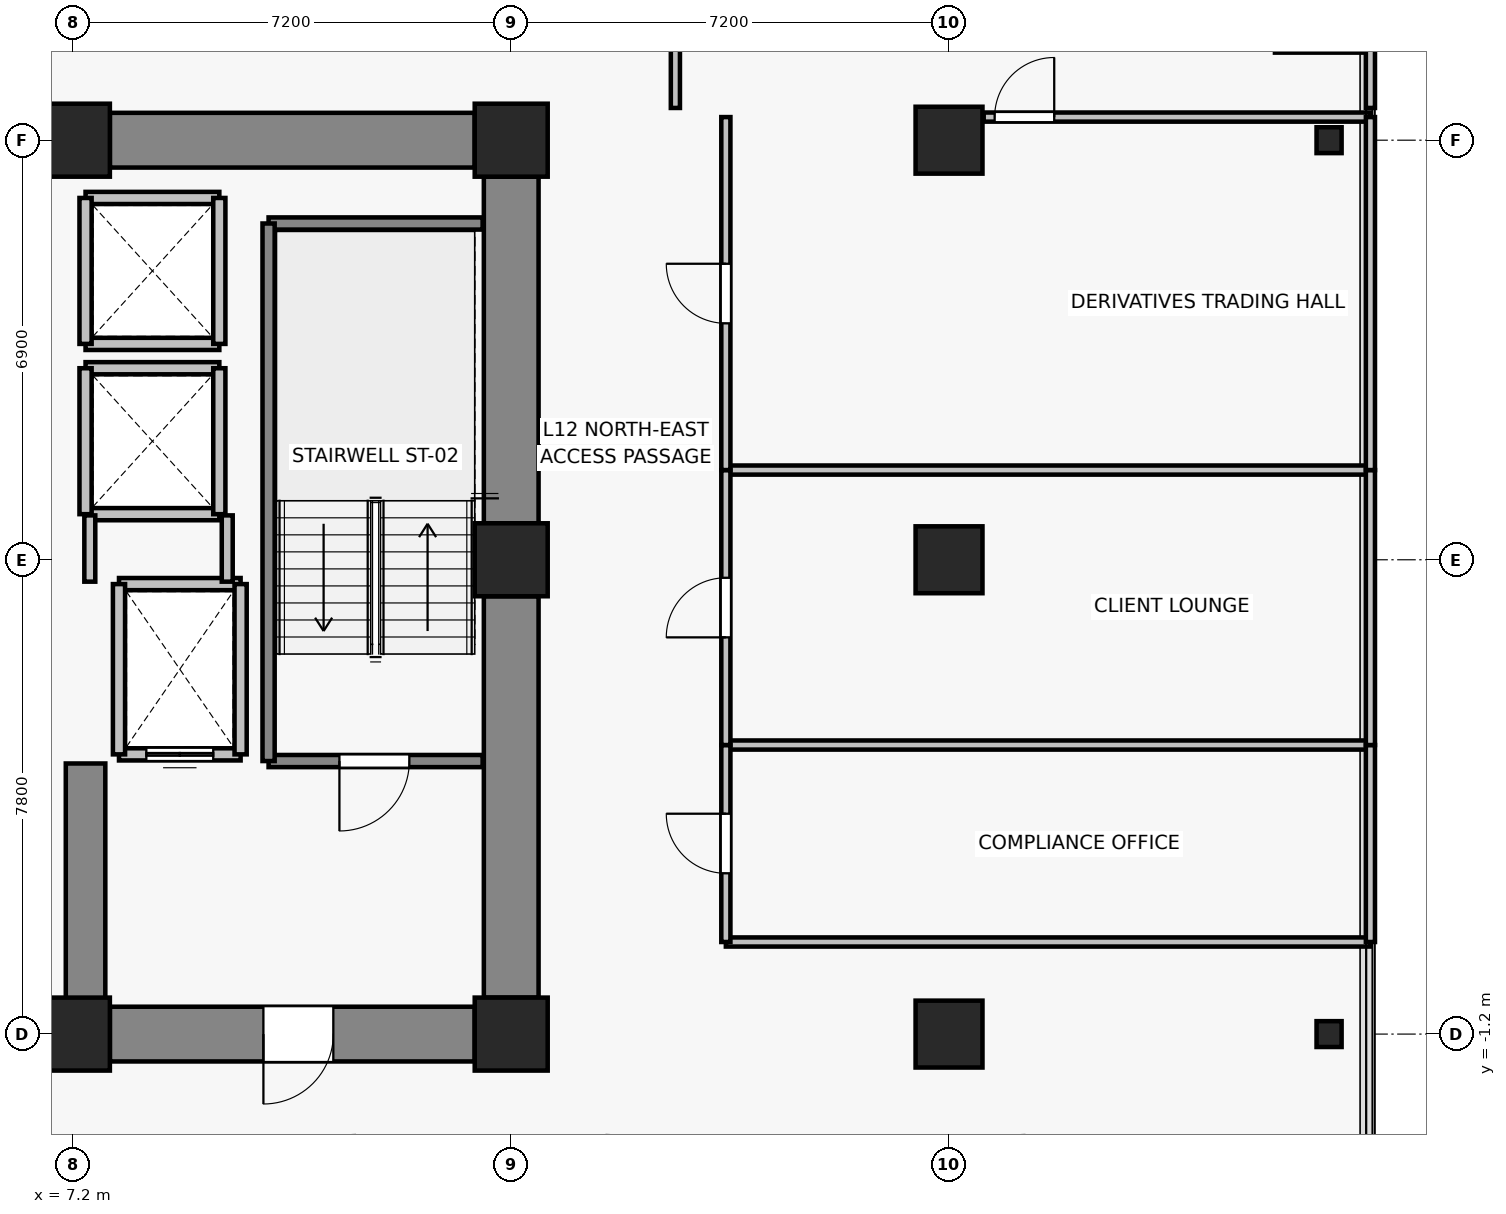
"""IFC4 building model, lengths in metres.
Left out: names, types, materials, properties, quantities, classifications, styles, units other than length and angle.
Written with IfcOpenShell. Run it as: python <this file> out.ifc"""

import sys

from ifc_helpers import new_model, si_unit, direction, frame, frame_2d, origin, origin_2d, place, context, subcontext, project, spatial, rectangle, i_section, extrude, source, transform, mapped, element, fill, save


model = new_model("IFC4")
c1 = context("Model", 3, precision=1e-05, world=origin(), true_north=direction((0.0, 1.0)))
c2 = subcontext(c1, "Body", "Model", "MODEL_VIEW")
j1 = project(units=[si_unit("LENGTHUNIT", "METRE"), si_unit("PLANEANGLEUNIT", "RADIAN")], contexts=[c1])
p1 = place(None, origin())
s1 = spatial("IfcSite", under=j1, at=p1, CompositionType="ELEMENT")
p2 = place(p1, origin())
s2 = spatial("IfcBuilding", under=s1, at=p2, CompositionType="ELEMENT")
p3 = place(p2, frame((0.0, 0.0, 47.2)))
s3 = spatial("IfcBuildingStorey", under=s2, at=p3, CompositionType="ELEMENT", Elevation=47.2)
for number, where, z_axis, x_axis in (
    (1, (7.2, -1.2, 0.0), (0.0, 0.0, 1.0), (1.0, 0.0, 0.0)),
    (2, (14.4, -1.2, 0.0), (0.0, 0.0, 1.0), (1.0, 0.0, 0.0)),
    (3, (14.4, 6.6, 0.0), (0.0, 0.0, 1.0), (1.0, 0.0, 0.0)),
    (4, (7.2, 13.5, 0.0), (0.0, 0.0, 1.0), (1.0, 0.0, 0.0)),
    (5, (14.4, 13.5, 0.0), (0.0, 0.0, 1.0), (1.0, 0.0, 0.0)),
):
    element("IfcColumn", number, at=place(p3, frame(where, z_axis=z_axis, x_axis=x_axis)), inside=s3, PredefinedType="COLUMN", context=c2, shape_type="SweptSolid", body=[
        extrude(rectangle(XDim=1.2, YDim=1.2, at=origin_2d()), origin(), (0.0, 0.0, 1.0), 3.3),
    ])
for number, where, z_axis, x_axis in (
    (6, (21.6, -1.2, 0.0), (0.0, 0.0, 1.0), (1.0, 0.0, 0.0)),
    (7, (21.6, 6.6, 0.0), (0.0, 0.0, 1.0), (1.0, 0.0, 0.0)),
    (8, (21.6, 13.5, 0.0), (0.0, 0.0, 1.0), (1.0, 0.0, 0.0)),
):
    element("IfcColumn", number, at=place(p3, frame(where, z_axis=z_axis, x_axis=x_axis)), inside=s3, PredefinedType="COLUMN", context=c2, shape_type="SweptSolid", body=[
        extrude(rectangle(XDim=1.1, YDim=1.1, at=origin_2d()), origin(), (0.0, 0.0, 1.0), 3.3),
    ])
for number, where, z_axis, x_axis in (
    (9, (27.85, -1.2, 0.0), (0.0, 0.0, 1.0), (1.0, 0.0, 0.0)),
    (10, (27.85, 13.5, 0.0), (0.0, 0.0, 1.0), (1.0, 0.0, 0.0)),
):
    element("IfcColumn", number, at=place(p3, frame(where, z_axis=z_axis, x_axis=x_axis)), inside=s3, PredefinedType="COLUMN", context=c2, shape_type="SweptSolid", body=[
        extrude(i_section(OverallWidth=0.412, OverallDepth=0.425, WebThickness=0.026, FlangeThickness=0.039, FilletRadius=0.015, at=origin_2d()), origin(), (0.0, 0.0, 1.0), 3.3),
    ])
p4 = place(p3, frame((7.8, 13.5, 0.0), z_axis=(0.0, 0.0, 1.0), x_axis=(1.0, 0.0, 0.0)))
e11 = element("IfcWall", 11, at=p4, inside=s3, PredefinedType="SHEAR", context=c2, shape_type="SweptSolid", body=[
    extrude(rectangle(XDim=6.0, YDim=0.9, at=frame_2d((3.0, 0.0))), origin(), (0.0, 0.0, 1.0), 3.075),
])
p5 = place(p3, frame((14.4, -0.6, 0.0), z_axis=(0.0, 0.0, 1.0), x_axis=(0.0, 1.0, 0.0)))
e12 = element("IfcWall", 12, at=p5, inside=s3, PredefinedType="SHEAR", context=c2, shape_type="SweptSolid", body=[
    extrude(rectangle(XDim=6.6, YDim=0.9, at=frame_2d((3.3, 0.0))), origin(), (0.0, 0.0, 1.0), 3.075),
])
p6 = place(p3, frame((14.4, 7.2, 0.0), z_axis=(0.0, 0.0, 1.0), x_axis=(0.0, 1.0, 0.0)))
e13 = element("IfcWall", 13, at=p6, inside=s3, PredefinedType="SHEAR", context=c2, shape_type="SweptSolid", body=[
    extrude(rectangle(XDim=5.7, YDim=0.9, at=frame_2d((2.85, 0.0))), origin(), (0.0, 0.0, 1.0), 3.075),
])
p7 = place(p3, frame((13.8, -1.2, 0.0), z_axis=(0.0, 0.0, 1.0), x_axis=(-1.0, 0.0, 0.0)))
e14 = element("IfcWall", 14, at=p7, inside=s3, PredefinedType="SHEAR", context=c2, shape_type="SweptSolid", body=[
    extrude(rectangle(XDim=6.0, YDim=0.9, at=frame_2d((3.0, 0.0))), origin(), (0.0, 0.0, 1.0), 3.075),
])
p8 = place(p7, frame((2.325, 0.0, 0.0)))
e15 = element("IfcOpeningElement", 15, at=p8, cuts=e14, PredefinedType="OPENING", context=c2, shape_type="SweptSolid", body=[
    extrude(rectangle(XDim=1.15, YDim=2.15, at=frame_2d((0.575, 1.075))), frame((0.0, 0.46, 0.0), z_axis=(0.0, -1.0, 0.0), x_axis=(1.0, 0.0, 0.0)), (0.0, 0.0, 1.0), 0.92),
])
p9 = place(p3, frame((7.4, -0.75, 0.0), z_axis=(0.0, 0.0, 1.0), x_axis=(0.0, 1.0, 0.0)))
e16 = element("IfcWall", 16, at=p9, inside=s3, PredefinedType="SHEAR", context=c2, shape_type="SweptSolid", body=[
    extrude(rectangle(XDim=4.0, YDim=0.65, at=frame_2d((2.0, 0.0))), origin(), (0.0, 0.0, 1.0), 3.075),
])
p10 = place(p3, frame((28.46, 15.06, 0.0), z_axis=(0.0, 0.0, 1.0), x_axis=(-1.0, 0.0, 0.0)))
e17 = element("IfcWall", 17, at=p10, inside=s3, PredefinedType="SOLIDWALL", context=c2, shape_type="SweptSolid", body=[
    extrude(rectangle(XDim=1.5, YDim=0.24, at=frame_2d((0.75, 0.0))), origin(), (0.0, 0.0, 1.0), 3.075),
])
p11 = place(p3, frame((9.95, 3.4, 0.0), z_axis=(0.0, 0.0, 1.0), x_axis=(-1.0, 0.0, 0.0)))
e18 = element("IfcWall", 18, at=p11, inside=s3, PredefinedType="SOLIDWALL", context=c2, shape_type="SweptSolid", body=[
    extrude(rectangle(XDim=2.0, YDim=0.2, at=frame_2d((1.0, 0.0))), origin(), (0.0, 0.0, 1.0), 3.075),
])
p12 = place(p11, frame((0.45, 0.0, 0.0)))
e19 = element("IfcOpeningElement", 19, at=p12, cuts=e18, PredefinedType="OPENING", context=c2, shape_type="SweptSolid", body=[
    extrude(rectangle(XDim=1.1, YDim=2.2, at=frame_2d((0.55, 1.1))), frame((0.0, 0.11, 0.0), z_axis=(0.0, -1.0, 0.0), x_axis=(1.0, 0.0, 0.0)), (0.0, 0.0, 1.0), 0.22),
])
p13 = place(p3, frame((7.95, 6.2, 0.0), z_axis=(0.0, 0.0, 1.0), x_axis=(1.0, 0.0, 0.0)))
e20 = element("IfcWall", 20, at=p13, inside=s3, PredefinedType="SOLIDWALL", context=c2, shape_type="SweptSolid", body=[
    extrude(rectangle(XDim=2.0, YDim=0.2, at=frame_2d((1.0, 0.0))), origin(), (0.0, 0.0, 1.0), 3.075),
])
for number, where, z_axis, x_axis in (
    (21, (7.95, 3.4, 0.0), (0.0, 0.0, 1.0), (0.0, 1.0, 0.0)),
    (22, (9.95, 6.2, 0.0), (0.0, 0.0, 1.0), (0.0, -1.0, 0.0)),
):
    element("IfcWall", number, at=place(p3, frame(where, z_axis=z_axis, x_axis=x_axis)), inside=s3, PredefinedType="SOLIDWALL", context=c2, shape_type="SweptSolid", body=[
        extrude(rectangle(XDim=2.8, YDim=0.2, at=frame_2d((1.4, 0.0))), origin(), (0.0, 0.0, 1.0), 3.075),
    ])
for number, where, z_axis, x_axis in (
    (23, (9.6, 7.35, 0.0), (0.0, 0.0, 1.0), (-1.0, 0.0, 0.0)),
    (24, (7.4, 9.75, 0.0), (0.0, 0.0, 1.0), (1.0, 0.0, 0.0)),
):
    element("IfcWall", number, at=place(p3, frame(where, z_axis=z_axis, x_axis=x_axis)), inside=s3, PredefinedType="SOLIDWALL", context=c2, shape_type="SweptSolid", body=[
        extrude(rectangle(XDim=2.2, YDim=0.2, at=frame_2d((1.1, 0.0))), origin(), (0.0, 0.0, 1.0), 2.465),
    ])
p14 = place(p3, frame((7.4, 7.35, 0.0), z_axis=(0.0, 0.0, 1.0), x_axis=(0.0, 1.0, 0.0)))
e25 = element("IfcWall", 25, at=p14, inside=s3, PredefinedType="SOLIDWALL", context=c2, shape_type="SweptSolid", body=[
    extrude(rectangle(XDim=2.4, YDim=0.2, at=frame_2d((1.2, 0.0))), origin(), (0.0, 0.0, 1.0), 2.465),
])
p15 = place(p3, frame((9.6, 9.75, 0.0), z_axis=(0.0, 0.0, 1.0), x_axis=(0.0, -1.0, 0.0)))
e26 = element("IfcWall", 26, at=p15, inside=s3, PredefinedType="SOLIDWALL", context=c2, shape_type="SweptSolid", body=[
    extrude(rectangle(XDim=2.4, YDim=0.2, at=frame_2d((1.2, 0.0))), origin(), (0.0, 0.0, 1.0), 3.075),
])
for number, where, z_axis, x_axis in (
    (27, (9.6, 10.15, 0.0), (0.0, 0.0, 1.0), (-1.0, 0.0, 0.0)),
    (28, (7.4, 12.55, 0.0), (0.0, 0.0, 1.0), (1.0, 0.0, 0.0)),
):
    element("IfcWall", number, at=place(p3, frame(where, z_axis=z_axis, x_axis=x_axis)), inside=s3, PredefinedType="SOLIDWALL", context=c2, shape_type="SweptSolid", body=[
        extrude(rectangle(XDim=2.2, YDim=0.2, at=frame_2d((1.1, 0.0))), origin(), (0.0, 0.0, 1.0), 2.465),
    ])
p16 = place(p3, frame((7.4, 10.15, 0.0), z_axis=(0.0, 0.0, 1.0), x_axis=(0.0, 1.0, 0.0)))
e29 = element("IfcWall", 29, at=p16, inside=s3, PredefinedType="SOLIDWALL", context=c2, shape_type="SweptSolid", body=[
    extrude(rectangle(XDim=2.4, YDim=0.2, at=frame_2d((1.2, 0.0))), origin(), (0.0, 0.0, 1.0), 2.465),
])
p17 = place(p3, frame((9.6, 12.55, 0.0), z_axis=(0.0, 0.0, 1.0), x_axis=(0.0, -1.0, 0.0)))
e30 = element("IfcWall", 30, at=p17, inside=s3, PredefinedType="SOLIDWALL", context=c2, shape_type="SweptSolid", body=[
    extrude(rectangle(XDim=2.4, YDim=0.2, at=frame_2d((1.2, 0.0))), origin(), (0.0, 0.0, 1.0), 3.075),
])
p18 = place(p3, frame((13.93, 3.29, 0.0), z_axis=(0.0, 0.0, 1.0), x_axis=(-1.0, 0.0, 0.0)))
e31 = element("IfcWall", 31, at=p18, inside=s3, PredefinedType="SOLIDWALL", context=c2, shape_type="SweptSolid", body=[
    extrude(rectangle(XDim=3.52, YDim=0.2, at=frame_2d((1.76, 0.0))), origin(), (0.0, 0.0, 1.0), 3.075),
])
p19 = place(p18, frame((1.205, 0.0, 0.0)))
e32 = element("IfcOpeningElement", 32, at=p19, cuts=e31, PredefinedType="OPENING", context=c2, shape_type="SweptSolid", body=[
    extrude(rectangle(XDim=1.15, YDim=2.15, at=frame_2d((0.575, 1.075))), frame((0.0, 0.11, 0.0), z_axis=(0.0, -1.0, 0.0), x_axis=(1.0, 0.0, 0.0)), (0.0, 0.0, 1.0), 0.22),
])
p20 = place(p3, frame((10.41, 12.13, 0.0), z_axis=(0.0, 0.0, 1.0), x_axis=(1.0, 0.0, 0.0)))
e33 = element("IfcWall", 33, at=p20, inside=s3, PredefinedType="SOLIDWALL", context=c2, shape_type="SweptSolid", body=[
    extrude(rectangle(XDim=3.52, YDim=0.2, at=frame_2d((1.76, 0.0))), origin(), (0.0, 0.0, 1.0), 3.075),
])
p21 = place(p3, frame((10.41, 3.29, 0.0), z_axis=(0.0, 0.0, 1.0), x_axis=(0.0, 1.0, 0.0)))
e34 = element("IfcWall", 34, at=p21, inside=s3, PredefinedType="SOLIDWALL", context=c2, shape_type="SweptSolid", body=[
    extrude(rectangle(XDim=8.84, YDim=0.2, at=frame_2d((4.42, 0.0))), origin(), (0.0, 0.0, 1.0), 3.075),
])
p22 = place(p3, frame((7.47, 6.24, 0.0), z_axis=(0.0, 0.0, 1.0), x_axis=(0.0, 1.0, 0.0)))
e35 = element("IfcWall", 35, at=p22, inside=s3, PredefinedType="PARTITIONING", context=c2, shape_type="SweptSolid", body=[
    extrude(rectangle(XDim=1.09, YDim=0.18, at=frame_2d((0.545, 0.0))), origin(), (0.0, 0.0, 1.0), 2.465),
])
p23 = place(p3, frame((9.73, 7.33, 0.0), z_axis=(0.0, 0.0, 1.0), x_axis=(0.0, -1.0, 0.0)))
e36 = element("IfcWall", 36, at=p23, inside=s3, PredefinedType="PARTITIONING", context=c2, shape_type="SweptSolid", body=[
    extrude(rectangle(XDim=1.09, YDim=0.18, at=frame_2d((0.545, 0.0))), origin(), (0.0, 0.0, 1.0), 3.075),
])
for number, where, z_axis, x_axis in (
    (37, (28.53, 0.314, 0.0), (0.0, 0.0, 1.0), (-1.0, 0.0, 0.0)),
    (38, (17.93, 3.553, 0.0), (0.0, 0.0, 1.0), (1.0, 0.0, 0.0)),
):
    element("IfcWall", number, at=place(p3, frame(where, z_axis=z_axis, x_axis=x_axis)), inside=s3, PredefinedType="PARTITIONING", context=c2, shape_type="SweptSolid", body=[
        extrude(rectangle(XDim=10.6, YDim=0.15, at=frame_2d((5.3, 0.0))), origin(), (0.0, 0.0, 1.0), 2.465),
    ])
p24 = place(p3, frame((17.93, 0.314, 0.0), z_axis=(0.0, 0.0, 1.0), x_axis=(0.0, 1.0, 0.0)))
e39 = element("IfcWall", 39, at=p24, inside=s3, PredefinedType="PARTITIONING", context=c2, shape_type="SweptSolid", body=[
    extrude(rectangle(XDim=3.239, YDim=0.15, at=frame_2d((1.62, 0.0))), origin(), (0.0, 0.0, 1.0), 3.075),
])
p25 = place(p24, frame((1.13, 0.0, 0.0)))
e40 = element("IfcOpeningElement", 40, at=p25, cuts=e39, PredefinedType="OPENING", context=c2, shape_type="SweptSolid", body=[
    extrude(rectangle(XDim=0.98, YDim=2.15, at=frame_2d((0.49, 1.075))), frame((0.0, 0.085, 0.0), z_axis=(0.0, -1.0, 0.0), x_axis=(1.0, 0.0, 0.0)), (0.0, 0.0, 1.0), 0.17),
])
p26 = place(p3, frame((28.53, 3.553, 0.0), z_axis=(0.0, 0.0, 1.0), x_axis=(0.0, -1.0, 0.0)))
e41 = element("IfcWall", 41, at=p26, inside=s3, PredefinedType="PARTITIONING", context=c2, shape_type="SweptSolid", body=[
    extrude(rectangle(XDim=3.239, YDim=0.15, at=frame_2d((1.62, 0.0))), origin(), (0.0, 0.0, 1.0), 3.075),
])
p27 = place(p3, frame((17.93, 8.075, 0.0), z_axis=(0.0, 0.0, 1.0), x_axis=(1.0, 0.0, 0.0)))
e42 = element("IfcWall", 42, at=p27, inside=s3, PredefinedType="PARTITIONING", context=c2, shape_type="SweptSolid", body=[
    extrude(rectangle(XDim=10.6, YDim=0.15, at=frame_2d((5.3, 0.0))), origin(), (0.0, 0.0, 1.0), 2.465),
])
p28 = place(p3, frame((17.93, 3.553, 0.0), z_axis=(0.0, 0.0, 1.0), x_axis=(0.0, 1.0, 0.0)))
e43 = element("IfcWall", 43, at=p28, inside=s3, PredefinedType="PARTITIONING", context=c2, shape_type="SweptSolid", body=[
    extrude(rectangle(XDim=4.522, YDim=0.15, at=frame_2d((2.261, 0.0))), origin(), (0.0, 0.0, 1.0), 2.465),
])
p29 = place(p28, frame((1.771, 0.0, 0.0)))
e44 = element("IfcOpeningElement", 44, at=p29, cuts=e43, PredefinedType="OPENING", context=c2, shape_type="SweptSolid", body=[
    extrude(rectangle(XDim=0.98, YDim=2.15, at=frame_2d((0.49, 1.075))), frame((0.0, 0.085, 0.0), z_axis=(0.0, -1.0, 0.0), x_axis=(1.0, 0.0, 0.0)), (0.0, 0.0, 1.0), 0.17),
])
p30 = place(p3, frame((28.53, 8.075, 0.0), z_axis=(0.0, 0.0, 1.0), x_axis=(0.0, -1.0, 0.0)))
e45 = element("IfcWall", 45, at=p30, inside=s3, PredefinedType="PARTITIONING", context=c2, shape_type="SweptSolid", body=[
    extrude(rectangle(XDim=4.522, YDim=0.15, at=frame_2d((2.261, 0.0))), origin(), (0.0, 0.0, 1.0), 3.075),
])
p31 = place(p3, frame((22.17, 13.88, 0.0), z_axis=(0.0, 0.0, 1.0), x_axis=(1.0, 0.0, 0.0)))
e46 = element("IfcWall", 46, at=p31, inside=s3, PredefinedType="PARTITIONING", context=c2, shape_type="SweptSolid", body=[
    extrude(rectangle(XDim=6.36, YDim=0.15, at=frame_2d((3.18, 0.0))), origin(), (0.0, 0.0, 1.0), 3.075),
])
p32 = place(p31, frame((0.18, 0.0, 0.0)))
e47 = element("IfcOpeningElement", 47, at=p32, cuts=e46, PredefinedType="OPENING", context=c2, shape_type="SweptSolid", body=[
    extrude(rectangle(XDim=0.98, YDim=2.15, at=frame_2d((0.49, 1.075))), frame((0.0, 0.085, 0.0), z_axis=(0.0, -1.0, 0.0), x_axis=(1.0, 0.0, 0.0)), (0.0, 0.0, 1.0), 0.17),
])
p33 = place(p3, frame((17.93, 8.075, 0.0), z_axis=(0.0, 0.0, 1.0), x_axis=(0.0, 1.0, 0.0)))
e48 = element("IfcWall", 48, at=p33, inside=s3, PredefinedType="PARTITIONING", context=c2, shape_type="SweptSolid", body=[
    extrude(rectangle(XDim=5.805, YDim=0.15, at=frame_2d((2.902, 0.0))), origin(), (0.0, 0.0, 1.0), 2.465),
])
p34 = place(p33, frame((2.413, 0.0, 0.0)))
e49 = element("IfcOpeningElement", 49, at=p34, cuts=e48, PredefinedType="OPENING", context=c2, shape_type="SweptSolid", body=[
    extrude(rectangle(XDim=0.98, YDim=2.15, at=frame_2d((0.49, 1.075))), frame((0.0, 0.085, 0.0), z_axis=(0.0, -1.0, 0.0), x_axis=(1.0, 0.0, 0.0)), (0.0, 0.0, 1.0), 0.17),
])
p35 = place(p3, frame((28.53, 13.88, 0.0), z_axis=(0.0, 0.0, 1.0), x_axis=(0.0, -1.0, 0.0)))
e50 = element("IfcWall", 50, at=p35, inside=s3, PredefinedType="PARTITIONING", context=c2, shape_type="SweptSolid", body=[
    extrude(rectangle(XDim=5.805, YDim=0.15, at=frame_2d((2.902, 0.0))), origin(), (0.0, 0.0, 1.0), 3.075),
])
p36 = place(p3, frame((17.1, 18.13, 0.0), z_axis=(0.0, 0.0, 1.0), x_axis=(0.0, -1.0, 0.0)))
e51 = element("IfcWall", 51, at=p36, inside=s3, PredefinedType="PARTITIONING", context=c2, shape_type="SweptSolid", body=[
    extrude(rectangle(XDim=4.1, YDim=0.15, at=frame_2d((2.05, 0.0))), origin(), (0.0, 0.0, 1.0), 2.465),
])
p37 = place(p3, frame((28.53, 18.13, 0.0), z_axis=(0.0, 0.0, 1.0), x_axis=(0.0, -1.0, 0.0)))
e52 = element("IfcWall", 52, at=p37, inside=s3, PredefinedType="PARTITIONING", context=c2, shape_type="SweptSolid", body=[
    extrude(rectangle(XDim=4.1, YDim=0.15, at=frame_2d((2.05, 0.0))), origin(), (0.0, 0.0, 1.0), 3.075),
])
m1 = source(origin(), c2, "Body", "SweptSolid", [
    extrude(rectangle(XDim=1.1, YDim=2.2, at=frame_2d((0.55, 1.1))), frame((0.0, 0.025, 0.0), z_axis=(0.0, -1.0, 0.0), x_axis=(1.0, 0.0, 0.0)), (0.0, 0.0, 1.0), 0.05),
])
p38 = place(p12, origin())
e53 = element("IfcDoor", 53, at=p38, inside=s3, OperationType="DOUBLE_DOOR_SLIDING", PredefinedType="DOOR", context=c2, shape_type="MappedRepresentation", body=[
    mapped(m1, transform((0.0, 0.0, 0.0), x_axis=(1.0, 0.0, 0.0), y_axis=(0.0, 1.0, 0.0), z_axis=(0.0, 0.0, 1.0), scale=1.0)),
])
fill(e19, e53)
m2 = source(origin(), c2, "Body", "SweptSolid", [
    extrude(rectangle(XDim=1.15, YDim=2.15, at=frame_2d((0.575, 1.075))), frame((0.0, 0.025, 0.0), z_axis=(0.0, -1.0, 0.0), x_axis=(1.0, 0.0, 0.0)), (0.0, 0.0, 1.0), 0.05),
])
p39 = place(p19, origin())
e54 = element("IfcDoor", 54, at=p39, inside=s3, OperationType="SINGLE_SWING_RIGHT", PredefinedType="DOOR", context=c2, shape_type="MappedRepresentation", body=[
    mapped(m2, transform((0.0, 0.0, 0.0), x_axis=(1.0, 0.0, 0.0), y_axis=(0.0, 1.0, 0.0), z_axis=(0.0, 0.0, 1.0), scale=1.0)),
])
fill(e32, e54)
p40 = place(p8, origin())
e55 = element("IfcDoor", 55, at=p40, inside=s3, OperationType="SINGLE_SWING_RIGHT", PredefinedType="DOOR", context=c2, shape_type="MappedRepresentation", body=[
    mapped(m2, transform((0.0, 0.0, 0.0), x_axis=(1.0, 0.0, 0.0), y_axis=(0.0, 1.0, 0.0), z_axis=(0.0, 0.0, 1.0), scale=1.0)),
])
fill(e15, e55)
m3 = source(origin(), c2, "Body", "SweptSolid", [
    extrude(rectangle(XDim=0.98, YDim=2.15, at=frame_2d((0.49, 1.075))), frame((0.0, 0.025, 0.0), z_axis=(0.0, -1.0, 0.0), x_axis=(1.0, 0.0, 0.0)), (0.0, 0.0, 1.0), 0.05),
])
p41 = place(p25, origin())
e56 = element("IfcDoor", 56, at=p41, inside=s3, OperationType="SINGLE_SWING_RIGHT", PredefinedType="DOOR", context=c2, shape_type="MappedRepresentation", body=[
    mapped(m3, transform((0.0, 0.0, 0.0), x_axis=(1.0, 0.0, 0.0), y_axis=(0.0, 1.0, 0.0), z_axis=(0.0, 0.0, 1.0), scale=1.0)),
])
fill(e40, e56)
p42 = place(p29, origin())
e57 = element("IfcDoor", 57, at=p42, inside=s3, OperationType="SINGLE_SWING_LEFT", PredefinedType="DOOR", context=c2, shape_type="MappedRepresentation", body=[
    mapped(m3, transform((0.0, 0.0, 0.0), x_axis=(1.0, 0.0, 0.0), y_axis=(0.0, 1.0, 0.0), z_axis=(0.0, 0.0, 1.0), scale=1.0)),
])
fill(e44, e57)
p43 = place(p34, origin())
e58 = element("IfcDoor", 58, at=p43, inside=s3, OperationType="SINGLE_SWING_RIGHT", PredefinedType="DOOR", context=c2, shape_type="MappedRepresentation", body=[
    mapped(m3, transform((0.0, 0.0, 0.0), x_axis=(1.0, 0.0, 0.0), y_axis=(0.0, 1.0, 0.0), z_axis=(0.0, 0.0, 1.0), scale=1.0)),
])
fill(e49, e58)
p44 = place(p32, origin())
e59 = element("IfcDoor", 59, at=p44, inside=s3, OperationType="SINGLE_SWING_RIGHT", PredefinedType="DOOR", context=c2, shape_type="MappedRepresentation", body=[
    mapped(m3, transform((0.0, 0.0, 0.0), x_axis=(1.0, 0.0, 0.0), y_axis=(0.0, 1.0, 0.0), z_axis=(0.0, 0.0, 1.0), scale=1.0)),
])
fill(e47, e59)
save(model, sys.argv[1])
